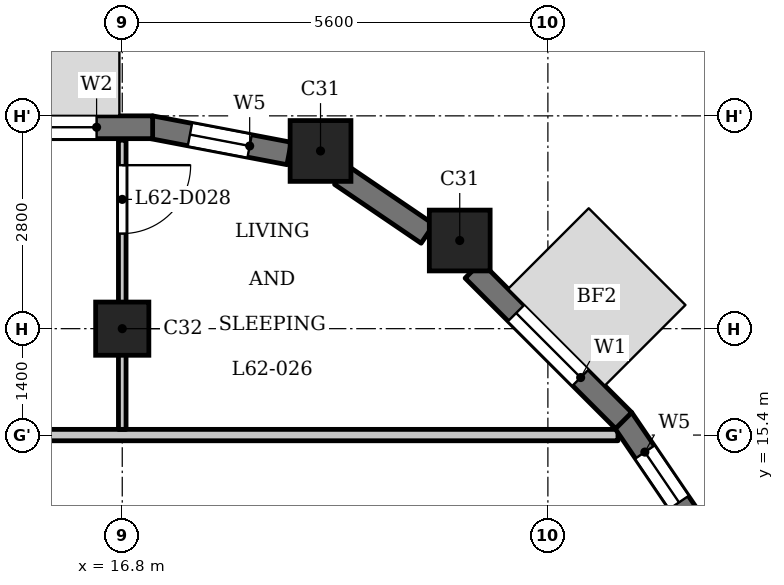
"""IFC4 building model, lengths in metres.
Left out: names, types, materials, properties, quantities, classifications, styles, units other than length and angle.
Written with IfcOpenShell. Run it as: python <this file> out.ifc"""

import sys

from ifc_helpers import new_model, si_unit, direction, frame, frame_2d, origin, origin_2d, place, context, subcontext, project, spatial, rectangle, extrude, element, fill, save


model = new_model("IFC4")
c1 = context("Model", 3, precision=1e-05, world=origin(), true_north=direction((0.0, 1.0)))
c2 = subcontext(c1, "Body", "Model", "MODEL_VIEW")
j1 = project(units=[si_unit("LENGTHUNIT", "METRE"), si_unit("PLANEANGLEUNIT", "RADIAN")], contexts=[c1])
p1 = place(None, origin())
s1 = spatial("IfcSite", under=j1, at=p1, CompositionType="ELEMENT")
p2 = place(p1, origin())
s2 = spatial("IfcBuilding", under=s1, at=p2, CompositionType="ELEMENT")
p3 = place(p2, frame((0.0, 0.0, 241.7)))
s3 = spatial("IfcBuildingStorey", under=s2, at=p3, CompositionType="ELEMENT", Elevation=241.7)
for number, where, z_axis, x_axis in (
    (1, (21.24, 17.96, 0.0), (0.0, 0.0, 1.0), (1.0, 0.0, 0.0)),
    (2, (19.409, 19.138, 0.0), (0.0, 0.0, 1.0), (1.0, 0.0, 0.0)),
):
    element("IfcColumn", number, at=place(p3, frame(where, z_axis=z_axis, x_axis=x_axis)), inside=s3, PredefinedType="COLUMN", context=c2, shape_type="SweptSolid", body=[
        extrude(rectangle(XDim=0.8, YDim=0.8, at=origin_2d()), origin(), (0.0, 0.0, 1.0), 3.5),
    ])
p4 = place(p3, frame((16.8, 16.8, 0.0), z_axis=(0.0, 0.0, 1.0), x_axis=(1.0, 0.0, 0.0)))
e3 = element("IfcColumn", 3, at=p4, inside=s3, PredefinedType="COLUMN", context=c2, shape_type="SweptSolid", body=[
    extrude(rectangle(XDim=0.7, YDim=0.7, at=origin_2d()), origin(), (0.0, 0.0, 1.0), 3.5),
])
p5 = place(p3, frame((24.422, 14.078, 0.0), z_axis=(0.0, 0.0, 1.0), x_axis=(-0.562054549384, 0.827100165347, 0.0)))
e4 = element("IfcWall", 4, at=p5, inside=s3, PredefinedType="SOLIDWALL", context=c2, shape_type="SweptSolid", body=[
    extrude(rectangle(XDim=1.856, YDim=0.3, at=frame_2d((0.928, 0.0))), origin(), (0.0, 0.0, 1.0), 2.55),
])
p6 = place(p5, frame((0.528, 0.0, 0.6)))
e5 = element("IfcOpeningElement", 5, at=p6, cuts=e4, PredefinedType="OPENING", context=c2, shape_type="SweptSolid", body=[
    extrude(rectangle(XDim=0.8, YDim=1.55, at=frame_2d((0.4, 0.775))), frame((0.0, 0.16, 0.0), z_axis=(0.0, -1.0, 0.0), x_axis=(1.0, 0.0, 0.0)), (0.0, 0.0, 1.0), 0.32),
])
p7 = place(p3, frame((23.397, 15.591, 0.0), z_axis=(0.0, 0.0, 1.0), x_axis=(-0.707150377276, 0.707063182409, 0.0)))
e6 = element("IfcWall", 6, at=p7, inside=s3, PredefinedType="SOLIDWALL", context=c2, shape_type="SweptSolid", body=[
    extrude(rectangle(XDim=2.8, YDim=0.3, at=frame_2d((1.4, 0.0))), origin(), (0.0, 0.0, 1.0), 2.55),
])
p8 = place(p7, frame((0.8, 0.0, 0.6)))
e7 = element("IfcOpeningElement", 7, at=p8, cuts=e6, PredefinedType="OPENING", context=c2, shape_type="SweptSolid", body=[
    extrude(rectangle(XDim=1.2, YDim=1.55, at=frame_2d((0.6, 0.775))), frame((0.0, 0.16, 0.0), z_axis=(0.0, -1.0, 0.0), x_axis=(1.0, 0.0, 0.0)), (0.0, 0.0, 1.0), 0.32),
])
p9 = place(p3, frame((20.817, 18.048, 0.0), z_axis=(0.0, 0.0, 1.0), x_axis=(-0.827025410886, 0.562164539747, 0.0)))
e8 = element("IfcWall", 8, at=p9, inside=s3, PredefinedType="SOLIDWALL", context=c2, shape_type="SweptSolid", body=[
    extrude(rectangle(XDim=1.377, YDim=0.3, at=frame_2d((0.688, 0.0))), origin(), (0.0, 0.0, 1.0), 2.55),
])
p10 = place(p3, frame((18.995, 19.105, 0.0), z_axis=(0.0, 0.0, 1.0), x_axis=(-0.982301706131, 0.187305520826, 0.0)))
e9 = element("IfcWall", 9, at=p10, inside=s3, PredefinedType="SOLIDWALL", context=c2, shape_type="SweptSolid", body=[
    extrude(rectangle(XDim=1.856, YDim=0.3, at=frame_2d((0.928, 0.0))), origin(), (0.0, 0.0, 1.0), 2.55),
])
p11 = place(p10, frame((0.528, 0.0, 0.6)))
e10 = element("IfcOpeningElement", 10, at=p11, cuts=e9, PredefinedType="OPENING", context=c2, shape_type="SweptSolid", body=[
    extrude(rectangle(XDim=0.8, YDim=1.55, at=frame_2d((0.4, 0.775))), frame((0.0, 0.16, 0.0), z_axis=(0.0, -1.0, 0.0), x_axis=(1.0, 0.0, 0.0)), (0.0, 0.0, 1.0), 0.32),
])
p12 = place(p3, frame((17.2, 19.45, 0.0), z_axis=(0.0, 0.0, 1.0), x_axis=(-1.0, 0.0, 0.0)))
e11 = element("IfcWall", 11, at=p12, inside=s3, PredefinedType="SOLIDWALL", context=c2, shape_type="SweptSolid", body=[
    extrude(rectangle(XDim=2.8, YDim=0.3, at=frame_2d((1.4, 0.0))), origin(), (0.0, 0.0, 1.0), 2.55),
])
p13 = place(p12, frame((0.738, 0.0, 0.9)))
e12 = element("IfcOpeningElement", 12, at=p13, cuts=e11, PredefinedType="OPENING", context=c2, shape_type="SweptSolid", body=[
    extrude(rectangle(XDim=1.8, YDim=1.25, at=frame_2d((0.9, 0.625))), frame((0.0, 0.16, 0.0), z_axis=(0.0, -1.0, 0.0), x_axis=(1.0, 0.0, 0.0)), (0.0, 0.0, 1.0), 0.32),
])
p14 = place(p3, frame((-23.55, 15.4, 0.0), z_axis=(0.0, 0.0, 1.0), x_axis=(1.0, 0.0, 0.0)))
e13 = element("IfcWall", 13, at=p14, inside=s3, PredefinedType="PARTITIONING", context=c2, shape_type="SweptSolid", body=[
    extrude(rectangle(XDim=46.872, YDim=0.15, at=frame_2d((23.436, 0.0))), origin(), (0.0, 0.0, 1.0), 3.2),
])
p15 = place(p14, frame((12.9, 0.0, 0.0)))
e14 = element("IfcOpeningElement", 14, at=p15, cuts=e13, PredefinedType="OPENING", context=c2, shape_type="SweptSolid", body=[
    extrude(rectangle(XDim=1.0, YDim=2.1, at=frame_2d((0.5, 1.05))), frame((0.0, 0.085, 0.0), z_axis=(0.0, -1.0, 0.0), x_axis=(1.0, 0.0, 0.0)), (0.0, 0.0, 1.0), 0.17),
])
p16 = place(p14, frame((20.9, 0.0, 0.0)))
e15 = element("IfcOpeningElement", 15, at=p16, cuts=e13, PredefinedType="OPENING", context=c2, shape_type="SweptSolid", body=[
    extrude(rectangle(XDim=1.0, YDim=2.1, at=frame_2d((0.5, 1.05))), frame((0.0, 0.085, 0.0), z_axis=(0.0, -1.0, 0.0), x_axis=(1.0, 0.0, 0.0)), (0.0, 0.0, 1.0), 0.17),
])
p17 = place(p14, frame((37.7, 0.0, 0.0)))
e16 = element("IfcOpeningElement", 16, at=p17, cuts=e13, PredefinedType="OPENING", context=c2, shape_type="SweptSolid", body=[
    extrude(rectangle(XDim=1.0, YDim=2.1, at=frame_2d((0.5, 1.05))), frame((0.0, 0.085, 0.0), z_axis=(0.0, -1.0, 0.0), x_axis=(1.0, 0.0, 0.0)), (0.0, 0.0, 1.0), 0.17),
])
p18 = place(p3, frame((16.8, 15.475, 0.0), z_axis=(0.0, 0.0, 1.0), x_axis=(0.0, 1.0, 0.0)))
e17 = element("IfcWall", 17, at=p18, inside=s3, PredefinedType="PARTITIONING", context=c2, shape_type="SweptSolid", body=[
    extrude(rectangle(XDim=3.805, YDim=0.1, at=frame_2d((1.902, 0.0))), origin(), (0.0, 0.0, 1.0), 3.2),
])
p19 = place(p18, frame((2.576, 0.0, 0.0)))
e18 = element("IfcOpeningElement", 18, at=p19, cuts=e17, PredefinedType="OPENING", context=c2, shape_type="SweptSolid", body=[
    extrude(rectangle(XDim=0.9, YDim=2.1, at=frame_2d((0.45, 1.05))), frame((0.0, 0.06, 0.0), z_axis=(0.0, -1.0, 0.0), x_axis=(1.0, 0.0, 0.0)), (0.0, 0.0, 1.0), 0.12),
])
p20 = place(p19, origin())
e19 = element("IfcDoor", 19, at=p20, inside=s3, OperationType="SINGLE_SWING_RIGHT", PredefinedType="DOOR", context=c2, shape_type="SweptSolid", body=[
    extrude(rectangle(XDim=0.9, YDim=2.1, at=frame_2d((0.45, 1.05))), frame((0.0, 0.025, 0.0), z_axis=(0.0, -1.0, 0.0), x_axis=(1.0, 0.0, 0.0)), (0.0, 0.0, 1.0), 0.05),
])
fill(e18, e19)
p21 = place(p6, origin())
e20 = element("IfcWindow", 20, at=p21, inside=s3, PartitioningType="SINGLE_PANEL", PredefinedType="WINDOW", context=c2, shape_type="SweptSolid", body=[
    extrude(rectangle(XDim=0.8, YDim=1.55, at=frame_2d((0.4, 0.775))), frame((0.0, 0.03, 0.0), z_axis=(0.0, -1.0, 0.0), x_axis=(1.0, 0.0, 0.0)), (0.0, 0.0, 1.0), 0.06),
])
fill(e5, e20)
p22 = place(p8, origin())
e21 = element("IfcWindow", 21, at=p22, inside=s3, PartitioningType="SINGLE_PANEL", PredefinedType="WINDOW", context=c2, shape_type="SweptSolid", body=[
    extrude(rectangle(XDim=1.2, YDim=1.55, at=frame_2d((0.6, 0.775))), frame((0.0, 0.03, 0.0), z_axis=(0.0, -1.0, 0.0), x_axis=(1.0, 0.0, 0.0)), (0.0, 0.0, 1.0), 0.06),
])
fill(e7, e21)
p23 = place(p11, origin())
e22 = element("IfcWindow", 22, at=p23, inside=s3, PartitioningType="SINGLE_PANEL", PredefinedType="WINDOW", context=c2, shape_type="SweptSolid", body=[
    extrude(rectangle(XDim=0.8, YDim=1.55, at=frame_2d((0.4, 0.775))), frame((0.0, 0.03, 0.0), z_axis=(0.0, -1.0, 0.0), x_axis=(1.0, 0.0, 0.0)), (0.0, 0.0, 1.0), 0.06),
])
fill(e10, e22)
p24 = place(p13, origin())
e23 = element("IfcWindow", 23, at=p24, inside=s3, PartitioningType="SINGLE_PANEL", PredefinedType="WINDOW", context=c2, shape_type="SweptSolid", body=[
    extrude(rectangle(XDim=1.8, YDim=1.25, at=frame_2d((0.9, 0.625))), frame((0.0, 0.03, 0.0), z_axis=(0.0, -1.0, 0.0), x_axis=(1.0, 0.0, 0.0)), (0.0, 0.0, 1.0), 0.06),
])
fill(e12, e23)
save(model, sys.argv[1])
